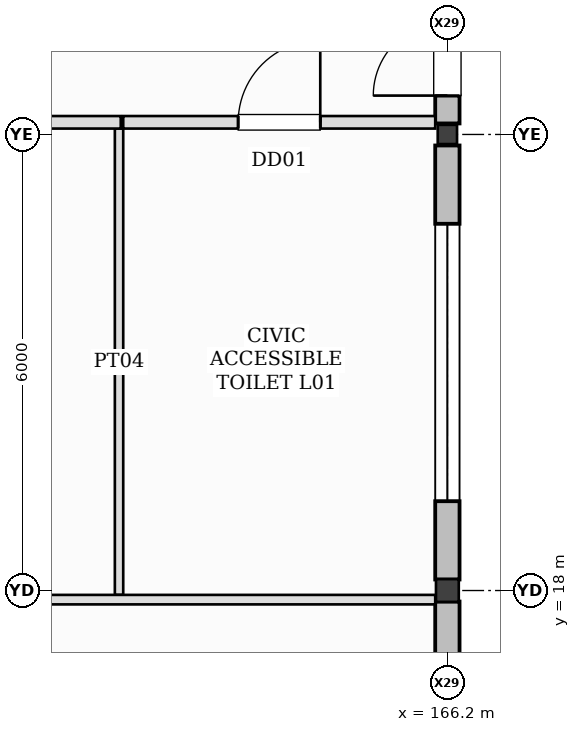
"""IFC4 building model, lengths in metres.
Left out: names, types, materials, properties, quantities, classifications, styles, units other than length and angle.
Written with IfcOpenShell. Run it as: python <this file> out.ifc"""

import sys

from ifc_helpers import new_model, si_unit, direction, frame, frame_2d, origin, origin_2d, place, context, subcontext, project, spatial, rectangle, hollow_rectangle, i_section, extrude, element, fill, save


model = new_model("IFC4")
c1 = context("Model", 3, precision=1e-05, world=origin(), true_north=direction((0.0, 1.0)))
c2 = subcontext(c1, "Body", "Model", "MODEL_VIEW")
j1 = project(units=[si_unit("LENGTHUNIT", "METRE"), si_unit("PLANEANGLEUNIT", "RADIAN")], contexts=[c1])
p1 = place(None, origin())
s1 = spatial("IfcSite", under=j1, at=p1, CompositionType="ELEMENT")
p2 = place(p1, origin())
s2 = spatial("IfcBuilding", under=s1, at=p2, CompositionType="ELEMENT")
p3 = place(p2, origin())
s3 = spatial("IfcBuildingStorey", under=s2, at=p3, CompositionType="ELEMENT", Elevation=0.0)
p4 = place(p3, frame((166.2, 18.0, -0.41), z_axis=(0.0, 0.0, 1.0), x_axis=(1.0, 0.0, 0.0)))
e1 = element("IfcColumn", 1, at=p4, inside=s3, PredefinedType="COLUMN", context=c2, shape_type="SweptSolid", body=[
    extrude(hollow_rectangle(XDim=0.3, YDim=0.3, WallThickness=0.012, at=origin_2d()), origin(), (0.0, 0.0, 1.0), 6.41),
])
p5 = place(p3, frame((166.2, 24.0, -0.41), z_axis=(0.0, 0.0, 1.0), x_axis=(1.0, 0.0, 0.0)))
e2 = element("IfcColumn", 2, at=p5, inside=s3, PredefinedType="COLUMN", context=c2, shape_type="SweptSolid", body=[
    extrude(i_section(OverallWidth=0.254, OverallDepth=0.253, WebThickness=0.009, FlangeThickness=0.014, at=origin_2d()), origin(), (0.0, 0.0, 1.0), 6.41),
])
p6 = place(p3, frame((166.2, 13.945, 0.0), z_axis=(0.0, 0.0, 1.0), x_axis=(0.0, 1.0, 0.0)))
e3 = element("IfcWall", 3, at=p6, inside=s3, PredefinedType="STANDARD", context=c2, shape_type="SweptSolid", body=[
    extrude(rectangle(XDim=3.91, YDim=0.32, at=frame_2d((1.955, 0.0))), origin(), (0.0, 0.0, 1.0), 5.044),
])
p7 = place(p6, frame((1.265, 0.0, 1.0)))
e4 = element("IfcOpeningElement", 4, at=p7, cuts=e3, PredefinedType="OPENING", context=c2, shape_type="SweptSolid", body=[
    extrude(rectangle(XDim=1.38, YDim=1.38, at=frame_2d((0.69, 0.69))), frame((0.0, 0.17, 0.0), z_axis=(0.0, -1.0, 0.0), x_axis=(1.0, 0.0, 0.0)), (0.0, 0.0, 1.0), 0.34),
])
p8 = place(p3, frame((166.2, 18.145, 0.0), z_axis=(0.0, 0.0, 1.0), x_axis=(0.0, 1.0, 0.0)))
e5 = element("IfcWall", 5, at=p8, inside=s3, PredefinedType="STANDARD", context=c2, shape_type="SweptSolid", body=[
    extrude(rectangle(XDim=5.71, YDim=0.32, at=frame_2d((2.855, 0.0))), origin(), (0.0, 0.0, 1.0), 5.044),
])
p9 = place(p8, frame((1.03, 0.0, 1.0)))
e6 = element("IfcOpeningElement", 6, at=p9, cuts=e5, PredefinedType="OPENING", context=c2, shape_type="SweptSolid", body=[
    extrude(rectangle(XDim=3.65, YDim=1.08, at=frame_2d((1.825, 0.54))), frame((0.0, 0.17, 0.0), z_axis=(0.0, -1.0, 0.0), x_axis=(1.0, 0.0, 0.0)), (0.0, 0.0, 1.0), 0.34),
])
p10 = place(p3, frame((166.2, 24.145, 0.0), z_axis=(0.0, 0.0, 1.0), x_axis=(0.0, 1.0, 0.0)))
e7 = element("IfcWall", 7, at=p10, inside=s3, PredefinedType="STANDARD", context=c2, shape_type="SweptSolid", body=[
    extrude(rectangle(XDim=5.71, YDim=0.32, at=frame_2d((2.855, 0.0))), origin(), (0.0, 0.0, 1.0), 5.044),
])
p11 = place(p10, frame((0.366, 0.0, 0.0)))
e8 = element("IfcOpeningElement", 8, at=p11, cuts=e7, PredefinedType="OPENING", context=c2, shape_type="SweptSolid", body=[
    extrude(rectangle(XDim=1.95, YDim=2.35, at=frame_2d((0.975, 1.175))), frame((0.0, 0.17, 0.0), z_axis=(0.0, -1.0, 0.0), x_axis=(1.0, 0.0, 0.0)), (0.0, 0.0, 1.0), 0.34),
])
p12 = place(p3, frame((142.433, 17.88, 0.0), z_axis=(0.0, 0.0, 1.0), x_axis=(1.0, 0.0, 0.0)))
e9 = element("IfcWall", 9, at=p12, inside=s3, PredefinedType="PARTITIONING", context=c2, shape_type="SweptSolid", body=[
    extrude(rectangle(XDim=23.607, YDim=0.125, at=frame_2d((11.804, 0.0))), origin(), (0.0, 0.0, 1.0), 5.035),
])
p13 = place(p3, frame((157.942, 24.16, 0.0), z_axis=(0.0, 0.0, 1.0), x_axis=(1.0, 0.0, 0.0)))
e10 = element("IfcWall", 10, at=p13, inside=s3, PredefinedType="PARTITIONING", context=c2, shape_type="SweptSolid", body=[
    extrude(rectangle(XDim=3.96, YDim=0.165, at=frame_2d((1.98, 0.0))), origin(), (0.0, 0.0, 1.0), 5.035),
])
p14 = place(p13, frame((0.393, 0.0, 0.0)))
e11 = element("IfcOpeningElement", 11, at=p14, cuts=e10, PredefinedType="OPENING", context=c2, shape_type="SweptSolid", body=[
    extrude(rectangle(XDim=1.08, YDim=2.14, at=frame_2d((0.54, 1.07))), frame((0.0, 0.093, 0.0), z_axis=(0.0, -1.0, 0.0), x_axis=(1.0, 0.0, 0.0)), (0.0, 0.0, 1.0), 0.185),
])
p15 = place(p3, frame((161.88, 24.08, 0.0), z_axis=(0.0, 0.0, 1.0), x_axis=(0.0, -1.0, 0.0)))
e12 = element("IfcWall", 12, at=p15, inside=s3, PredefinedType="PARTITIONING", context=c2, shape_type="SweptSolid", body=[
    extrude(rectangle(XDim=6.138, YDim=0.11, at=frame_2d((3.069, 0.0))), origin(), (0.0, 0.0, 1.0), 5.39),
])
p16 = place(p3, frame((161.935, 24.16, 0.0), z_axis=(0.0, 0.0, 1.0), x_axis=(1.0, 0.0, 0.0)))
e13 = element("IfcWall", 13, at=p16, inside=s3, PredefinedType="PARTITIONING", context=c2, shape_type="SweptSolid", body=[
    extrude(rectangle(XDim=4.105, YDim=0.165, at=frame_2d((2.052, 0.0))), origin(), (0.0, 0.0, 1.0), 5.035),
])
p17 = place(p16, frame((1.512, 0.0, 0.0)))
e14 = element("IfcOpeningElement", 14, at=p17, cuts=e13, PredefinedType="OPENING", context=c2, shape_type="SweptSolid", body=[
    extrude(rectangle(XDim=1.08, YDim=2.14, at=frame_2d((0.54, 1.07))), frame((0.0, 0.093, 0.0), z_axis=(0.0, -1.0, 0.0), x_axis=(1.0, 0.0, 0.0)), (0.0, 0.0, 1.0), 0.185),
])
p18 = place(p9, origin())
e15 = element("IfcWindow", 15, at=p18, inside=s3, PartitioningType="SINGLE_PANEL", PredefinedType="WINDOW", context=c2, shape_type="SweptSolid", body=[
    extrude(rectangle(XDim=3.65, YDim=1.08, at=frame_2d((1.825, 0.54))), frame((0.0, 0.03, 0.0), z_axis=(0.0, -1.0, 0.0), x_axis=(1.0, 0.0, 0.0)), (0.0, 0.0, 1.0), 0.06),
])
fill(e6, e15)
p19 = place(p11, frame((1.95, 0.0, 0.0), z_axis=(0.0, 0.0, 1.0), x_axis=(-1.0, 0.0, 0.0)))
e16 = element("IfcDoor", 16, at=p19, inside=s3, OperationType="DOUBLE_DOOR_SINGLE_SWING", PredefinedType="DOOR", context=c2, shape_type="SweptSolid", body=[
    extrude(rectangle(XDim=1.95, YDim=2.35, at=frame_2d((0.975, 1.175))), frame((0.0, 0.025, 0.0), z_axis=(0.0, -1.0, 0.0), x_axis=(1.0, 0.0, 0.0)), (0.0, 0.0, 1.0), 0.05),
])
fill(e8, e16)
p20 = place(p17, frame((1.08, 0.0, 0.0), z_axis=(0.0, 0.0, 1.0), x_axis=(-1.0, 0.0, 0.0)))
e17 = element("IfcDoor", 17, at=p20, inside=s3, OperationType="SINGLE_SWING_RIGHT", PredefinedType="DOOR", context=c2, shape_type="SweptSolid", body=[
    extrude(rectangle(XDim=1.08, YDim=2.14, at=frame_2d((0.54, 1.07))), frame((0.0, 0.025, 0.0), z_axis=(0.0, -1.0, 0.0), x_axis=(1.0, 0.0, 0.0)), (0.0, 0.0, 1.0), 0.05),
])
fill(e14, e17)
save(model, sys.argv[1])
